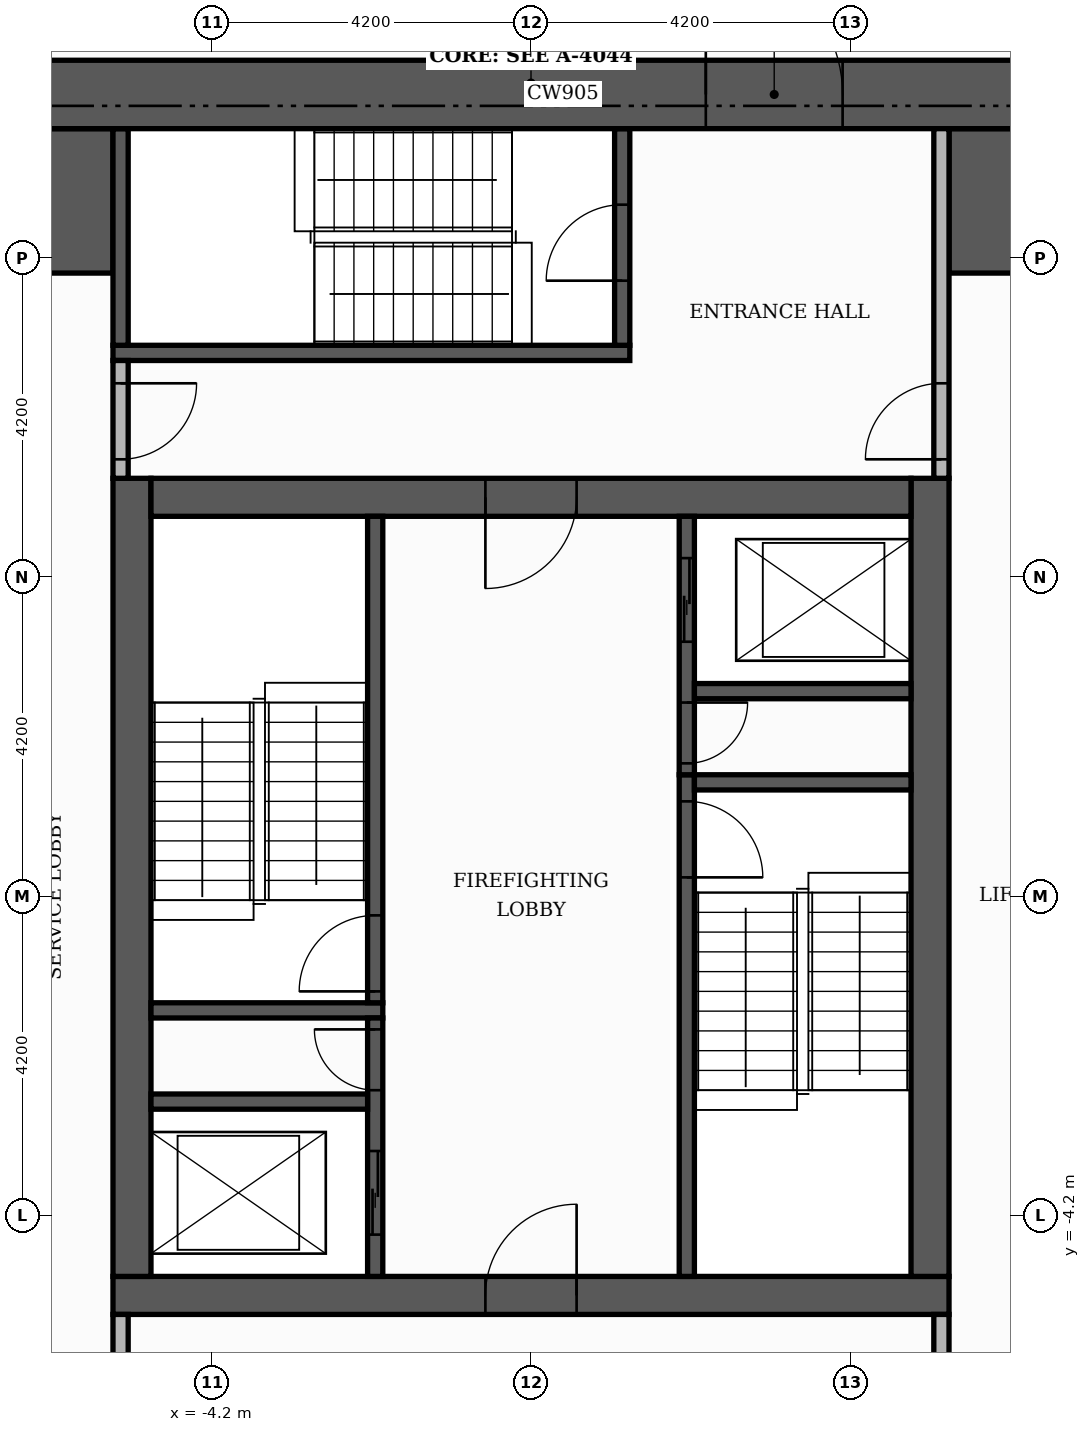
"""IFC4 building model, lengths in metres.
Left out: names, types, materials, properties, quantities, classifications, styles, units other than length and angle.
Written with IfcOpenShell. Run it as: python <this file> out.ifc"""

import sys

from ifc_helpers import new_model, si_unit, direction, frame, frame_2d, origin, place, context, subcontext, project, spatial, rectangle, extrude, element, fill, save


model = new_model("IFC4")
c1 = context("Model", 3, precision=1e-05, world=origin(), true_north=direction((0.0, 1.0)))
c2 = subcontext(c1, "Body", "Model", "MODEL_VIEW")
j1 = project(units=[si_unit("LENGTHUNIT", "METRE"), si_unit("PLANEANGLEUNIT", "RADIAN")], contexts=[c1])
p1 = place(None, origin())
s1 = spatial("IfcSite", under=j1, at=p1, CompositionType="ELEMENT")
p2 = place(p1, origin())
s2 = spatial("IfcBuilding", under=s1, at=p2, CompositionType="ELEMENT")
p3 = place(p2, frame((0.0, 0.0, 275.7)))
s3 = spatial("IfcBuildingStorey", under=s2, at=p3, CompositionType="ELEMENT", Elevation=275.7)
p4 = place(p3, frame((-5.5, -5.25, 0.0), z_axis=(0.0, 0.0, 1.0), x_axis=(1.0, 0.0, 0.0)))
e1 = element("IfcWall", 1, at=p4, inside=s3, PredefinedType="SHEAR", context=c2, shape_type="SweptSolid", body=[
    extrude(rectangle(XDim=11.0, YDim=0.5, at=frame_2d((5.5, 0.0))), origin(), (0.0, 0.0, 1.0), 3.48),
])
p5 = place(p4, frame((4.9, 0.0, 0.0)))
e2 = element("IfcOpeningElement", 2, at=p5, cuts=e1, PredefinedType="OPENING", context=c2, shape_type="SweptSolid", body=[
    extrude(rectangle(XDim=1.2, YDim=2.1, at=frame_2d((0.6, 1.05))), frame((0.0, 0.26, 0.0), z_axis=(0.0, -1.0, 0.0), x_axis=(1.0, 0.0, 0.0)), (0.0, 0.0, 1.0), 0.52),
])
for number, where, z_axis, x_axis in (
    (3, (-5.25, -5.0, 0.0), (0.0, 0.0, 1.0), (0.0, 1.0, 0.0)),
    (4, (5.25, -5.0, 0.0), (0.0, 0.0, 1.0), (0.0, 1.0, 0.0)),
):
    element("IfcWall", number, at=place(p3, frame(where, z_axis=z_axis, x_axis=x_axis)), inside=s3, PredefinedType="SHEAR", context=c2, shape_type="SweptSolid", body=[
        extrude(rectangle(XDim=10.5, YDim=0.5, at=frame_2d((5.25, 0.0))), origin(), (0.0, 0.0, 1.0), 3.48),
    ])
p6 = place(p3, frame((-5.0, 5.25, 0.0), z_axis=(0.0, 0.0, 1.0), x_axis=(1.0, 0.0, 0.0)))
e5 = element("IfcWall", 5, at=p6, inside=s3, PredefinedType="SHEAR", context=c2, shape_type="SweptSolid", body=[
    extrude(rectangle(XDim=10.0, YDim=0.5, at=frame_2d((5.0, 0.0))), origin(), (0.0, 0.0, 1.0), 3.48),
])
p7 = place(p6, frame((4.4, 0.0, 0.0)))
e6 = element("IfcOpeningElement", 6, at=p7, cuts=e5, PredefinedType="OPENING", context=c2, shape_type="SweptSolid", body=[
    extrude(rectangle(XDim=1.2, YDim=2.1, at=frame_2d((0.6, 1.05))), frame((0.0, 0.26, 0.0), z_axis=(0.0, -1.0, 0.0), x_axis=(1.0, 0.0, 0.0)), (0.0, 0.0, 1.0), 0.52),
])
for number, where, z_axis, x_axis in (
    (7, (-10.1, 9.15, 0.0), (0.0, 0.0, 1.0), (1.0, 0.0, 0.0)),
    (8, (5.5, 9.15, 0.0), (0.0, 0.0, 1.0), (1.0, 0.0, 0.0)),
):
    element("IfcWall", number, at=place(p3, frame(where, z_axis=z_axis, x_axis=x_axis)), inside=s3, PredefinedType="SHEAR", context=c2, shape_type="SweptSolid", body=[
        extrude(rectangle(XDim=4.6, YDim=1.9, at=frame_2d((2.3, 0.0))), origin(), (0.0, 0.0, 1.0), 3.48),
    ])
p8 = place(p3, frame((2.05, -5.0, 0.0), z_axis=(0.0, 0.0, 1.0), x_axis=(0.0, 1.0, 0.0)))
e9 = element("IfcWall", 9, at=p8, inside=s3, PredefinedType="SHEAR", context=c2, shape_type="SweptSolid", body=[
    extrude(rectangle(XDim=6.6, YDim=0.2, at=frame_2d((3.3, 0.0))), origin(), (0.0, 0.0, 1.0), 3.48),
])
p9 = place(p8, frame((5.25, 0.0, 0.0)))
e10 = element("IfcOpeningElement", 10, at=p9, cuts=e9, PredefinedType="OPENING", context=c2, shape_type="SweptSolid", body=[
    extrude(rectangle(XDim=1.0, YDim=2.1, at=frame_2d((0.5, 1.05))), frame((0.0, 0.11, 0.0), z_axis=(0.0, -1.0, 0.0), x_axis=(1.0, 0.0, 0.0)), (0.0, 0.0, 1.0), 0.22),
])
p10 = place(p3, frame((-5.0, -1.5, 0.0), z_axis=(0.0, 0.0, 1.0), x_axis=(1.0, 0.0, 0.0)))
e11 = element("IfcWall", 11, at=p10, inside=s3, PredefinedType="SHEAR", context=c2, shape_type="SweptSolid", body=[
    extrude(rectangle(XDim=3.05, YDim=0.2, at=frame_2d((1.525, 0.0))), origin(), (0.0, 0.0, 1.0), 3.48),
])
p11 = place(p3, frame((-2.05, -1.4, 0.0), z_axis=(0.0, 0.0, 1.0), x_axis=(0.0, 1.0, 0.0)))
e12 = element("IfcWall", 12, at=p11, inside=s3, PredefinedType="SHEAR", context=c2, shape_type="SweptSolid", body=[
    extrude(rectangle(XDim=6.4, YDim=0.2, at=frame_2d((3.2, 0.0))), origin(), (0.0, 0.0, 1.0), 3.48),
])
p12 = place(p11, frame((0.15, 0.0, 0.0)))
e13 = element("IfcOpeningElement", 13, at=p12, cuts=e12, PredefinedType="OPENING", context=c2, shape_type="SweptSolid", body=[
    extrude(rectangle(XDim=1.0, YDim=2.1, at=frame_2d((0.5, 1.05))), frame((0.0, 0.11, 0.0), z_axis=(0.0, -1.0, 0.0), x_axis=(1.0, 0.0, 0.0)), (0.0, 0.0, 1.0), 0.22),
])
p13 = place(p3, frame((2.15, 1.5, 0.0), z_axis=(0.0, 0.0, 1.0), x_axis=(1.0, 0.0, 0.0)))
e14 = element("IfcWall", 14, at=p13, inside=s3, PredefinedType="SHEAR", context=c2, shape_type="SweptSolid", body=[
    extrude(rectangle(XDim=2.85, YDim=0.2, at=frame_2d((1.425, 0.0))), origin(), (0.0, 0.0, 1.0), 3.48),
])
p14 = place(p3, frame((-5.5, 7.15, 0.0), z_axis=(0.0, 0.0, 1.0), x_axis=(1.0, 0.0, 0.0)))
e15 = element("IfcWall", 15, at=p14, inside=s3, PredefinedType="SHEAR", context=c2, shape_type="SweptSolid", body=[
    extrude(rectangle(XDim=6.8, YDim=0.2, at=frame_2d((3.4, 0.0))), origin(), (0.0, 0.0, 1.0), 3.48),
])
p15 = place(p3, frame((-5.4, 7.25, 0.0), z_axis=(0.0, 0.0, 1.0), x_axis=(0.0, 1.0, 0.0)))
e16 = element("IfcWall", 16, at=p15, inside=s3, PredefinedType="SHEAR", context=c2, shape_type="SweptSolid", body=[
    extrude(rectangle(XDim=2.85, YDim=0.2, at=frame_2d((1.425, 0.0))), origin(), (0.0, 0.0, 1.0), 3.48),
])
p16 = place(p3, frame((1.2, 7.25, 0.0), z_axis=(0.0, 0.0, 1.0), x_axis=(0.0, 1.0, 0.0)))
e17 = element("IfcWall", 17, at=p16, inside=s3, PredefinedType="SHEAR", context=c2, shape_type="SweptSolid", body=[
    extrude(rectangle(XDim=2.85, YDim=0.2, at=frame_2d((1.425, 0.0))), origin(), (0.0, 0.0, 1.0), 3.48),
])
p17 = place(p16, frame((0.85, 0.0, 0.0)))
e18 = element("IfcOpeningElement", 18, at=p17, cuts=e17, PredefinedType="OPENING", context=c2, shape_type="SweptSolid", body=[
    extrude(rectangle(XDim=1.0, YDim=2.1, at=frame_2d((0.5, 1.05))), frame((0.0, 0.11, 0.0), z_axis=(0.0, -1.0, 0.0), x_axis=(1.0, 0.0, 0.0)), (0.0, 0.0, 1.0), 0.22),
])
p18 = place(p3, frame((-2.05, -5.0, 0.0), z_axis=(0.0, 0.0, 1.0), x_axis=(0.0, 1.0, 0.0)))
e19 = element("IfcWall", 19, at=p18, inside=s3, PredefinedType="SHEAR", context=c2, shape_type="SweptSolid", body=[
    extrude(rectangle(XDim=3.4, YDim=0.2, at=frame_2d((1.7, 0.0))), origin(), (0.0, 0.0, 1.0), 3.48),
])
p19 = place(p18, frame((0.55, 0.0, 0.0)))
e20 = element("IfcOpeningElement", 20, at=p19, cuts=e19, PredefinedType="OPENING", context=c2, shape_type="SweptSolid", body=[
    extrude(rectangle(XDim=1.1, YDim=2.1, at=frame_2d((0.55, 1.05))), frame((0.0, 0.11, 0.0), z_axis=(0.0, -1.0, 0.0), x_axis=(1.0, 0.0, 0.0)), (0.0, 0.0, 1.0), 0.22),
])
p20 = place(p18, frame((2.45, 0.0, 0.0)))
e21 = element("IfcOpeningElement", 21, at=p20, cuts=e19, PredefinedType="OPENING", context=c2, shape_type="SweptSolid", body=[
    extrude(rectangle(XDim=0.8, YDim=2.1, at=frame_2d((0.4, 1.05))), frame((0.0, 0.11, 0.0), z_axis=(0.0, -1.0, 0.0), x_axis=(1.0, 0.0, 0.0)), (0.0, 0.0, 1.0), 0.22),
])
p21 = place(p3, frame((-5.0, -2.7, 0.0), z_axis=(0.0, 0.0, 1.0), x_axis=(1.0, 0.0, 0.0)))
e22 = element("IfcWall", 22, at=p21, inside=s3, PredefinedType="SHEAR", context=c2, shape_type="SweptSolid", body=[
    extrude(rectangle(XDim=2.85, YDim=0.2, at=frame_2d((1.425, 0.0))), origin(), (0.0, 0.0, 1.0), 3.48),
])
p22 = place(p3, frame((2.05, 1.6, 0.0), z_axis=(0.0, 0.0, 1.0), x_axis=(0.0, 1.0, 0.0)))
e23 = element("IfcWall", 23, at=p22, inside=s3, PredefinedType="SHEAR", context=c2, shape_type="SweptSolid", body=[
    extrude(rectangle(XDim=3.4, YDim=0.2, at=frame_2d((1.7, 0.0))), origin(), (0.0, 0.0, 1.0), 3.48),
])
p23 = place(p22, frame((1.75, 0.0, 0.0)))
e24 = element("IfcOpeningElement", 24, at=p23, cuts=e23, PredefinedType="OPENING", context=c2, shape_type="SweptSolid", body=[
    extrude(rectangle(XDim=1.1, YDim=2.1, at=frame_2d((0.55, 1.05))), frame((0.0, 0.11, 0.0), z_axis=(0.0, -1.0, 0.0), x_axis=(1.0, 0.0, 0.0)), (0.0, 0.0, 1.0), 0.22),
])
p24 = place(p22, frame((0.15, 0.0, 0.0)))
e25 = element("IfcOpeningElement", 25, at=p24, cuts=e23, PredefinedType="OPENING", context=c2, shape_type="SweptSolid", body=[
    extrude(rectangle(XDim=0.8, YDim=2.1, at=frame_2d((0.4, 1.05))), frame((0.0, 0.11, 0.0), z_axis=(0.0, -1.0, 0.0), x_axis=(1.0, 0.0, 0.0)), (0.0, 0.0, 1.0), 0.22),
])
p25 = place(p3, frame((2.15, 2.7, 0.0), z_axis=(0.0, 0.0, 1.0), x_axis=(1.0, 0.0, 0.0)))
e26 = element("IfcWall", 26, at=p25, inside=s3, PredefinedType="SHEAR", context=c2, shape_type="SweptSolid", body=[
    extrude(rectangle(XDim=2.85, YDim=0.2, at=frame_2d((1.425, 0.0))), origin(), (0.0, 0.0, 1.0), 3.48),
])
p26 = place(p3, frame((-11.0, 10.55, 0.0), z_axis=(0.0, 0.0, 1.0), x_axis=(1.0, 0.0, 0.0)))
e27 = element("IfcWall", 27, at=p26, inside=s3, PredefinedType="SHEAR", context=c2, shape_type="SweptSolid", body=[
    extrude(rectangle(XDim=22.0, YDim=0.9, at=frame_2d((11.0, 0.0))), origin(), (0.0, 0.0, 1.0), 3.48),
])
p27 = place(p26, frame((13.3, 0.0, 0.0)))
e28 = element("IfcOpeningElement", 28, at=p27, cuts=e27, PredefinedType="OPENING", context=c2, shape_type="SweptSolid", body=[
    extrude(rectangle(XDim=1.8, YDim=2.2, at=frame_2d((0.9, 1.1))), frame((0.0, 0.46, 0.0), z_axis=(0.0, -1.0, 0.0), x_axis=(1.0, 0.0, 0.0)), (0.0, 0.0, 1.0), 0.92),
])
p28 = place(p3, frame((-5.4, -10.1, 0.0), z_axis=(0.0, 0.0, 1.0), x_axis=(0.0, 1.0, 0.0)))
e29 = element("IfcWall", 29, at=p28, inside=s3, PredefinedType="PARTITIONING", context=c2, shape_type="SweptSolid", body=[
    extrude(rectangle(XDim=4.6, YDim=0.2, at=frame_2d((2.3, 0.0))), origin(), (0.0, 0.0, 1.0), 3.48),
])
p29 = place(p28, frame((2.9, 0.0, 0.0)))
e30 = element("IfcOpeningElement", 30, at=p29, cuts=e29, PredefinedType="OPENING", context=c2, shape_type="SweptSolid", body=[
    extrude(rectangle(XDim=1.0, YDim=2.1, at=frame_2d((0.5, 1.05))), frame((0.0, 0.11, 0.0), z_axis=(0.0, -1.0, 0.0), x_axis=(1.0, 0.0, 0.0)), (0.0, 0.0, 1.0), 0.22),
])
p30 = place(p3, frame((5.4, -10.1, 0.0), z_axis=(0.0, 0.0, 1.0), x_axis=(0.0, 1.0, 0.0)))
e31 = element("IfcWall", 31, at=p30, inside=s3, PredefinedType="PARTITIONING", context=c2, shape_type="SweptSolid", body=[
    extrude(rectangle(XDim=4.6, YDim=0.2, at=frame_2d((2.3, 0.0))), origin(), (0.0, 0.0, 1.0), 3.48),
])
p31 = place(p30, frame((2.9, 0.0, 0.0)))
e32 = element("IfcOpeningElement", 32, at=p31, cuts=e31, PredefinedType="OPENING", context=c2, shape_type="SweptSolid", body=[
    extrude(rectangle(XDim=1.0, YDim=2.1, at=frame_2d((0.5, 1.05))), frame((0.0, 0.11, 0.0), z_axis=(0.0, -1.0, 0.0), x_axis=(1.0, 0.0, 0.0)), (0.0, 0.0, 1.0), 0.22),
])
p32 = place(p3, frame((-5.4, 5.5, 0.0), z_axis=(0.0, 0.0, 1.0), x_axis=(0.0, 1.0, 0.0)))
e33 = element("IfcWall", 33, at=p32, inside=s3, PredefinedType="PARTITIONING", context=c2, shape_type="SweptSolid", body=[
    extrude(rectangle(XDim=1.55, YDim=0.2, at=frame_2d((0.775, 0.0))), origin(), (0.0, 0.0, 1.0), 3.48),
])
p33 = place(p32, frame((0.25, 0.0, 0.0)))
e34 = element("IfcOpeningElement", 34, at=p33, cuts=e33, PredefinedType="OPENING", context=c2, shape_type="SweptSolid", body=[
    extrude(rectangle(XDim=1.0, YDim=2.1, at=frame_2d((0.5, 1.05))), frame((0.0, 0.11, 0.0), z_axis=(0.0, -1.0, 0.0), x_axis=(1.0, 0.0, 0.0)), (0.0, 0.0, 1.0), 0.22),
])
p34 = place(p3, frame((5.4, 5.5, 0.0), z_axis=(0.0, 0.0, 1.0), x_axis=(0.0, 1.0, 0.0)))
e35 = element("IfcWall", 35, at=p34, inside=s3, PredefinedType="PARTITIONING", context=c2, shape_type="SweptSolid", body=[
    extrude(rectangle(XDim=4.6, YDim=0.2, at=frame_2d((2.3, 0.0))), origin(), (0.0, 0.0, 1.0), 3.48),
])
p35 = place(p34, frame((0.25, 0.0, 0.0)))
e36 = element("IfcOpeningElement", 36, at=p35, cuts=e35, PredefinedType="OPENING", context=c2, shape_type="SweptSolid", body=[
    extrude(rectangle(XDim=1.0, YDim=2.1, at=frame_2d((0.5, 1.05))), frame((0.0, 0.11, 0.0), z_axis=(0.0, -1.0, 0.0), x_axis=(1.0, 0.0, 0.0)), (0.0, 0.0, 1.0), 0.22),
])
p36 = place(p23, origin())
e37 = element("IfcDoor", 37, at=p36, inside=s3, OperationType="SLIDING_TO_LEFT", PredefinedType="DOOR", context=c2, shape_type="SweptSolid", body=[
    extrude(rectangle(XDim=1.1, YDim=2.1, at=frame_2d((0.55, 1.05))), frame((0.0, 0.025, 0.0), z_axis=(0.0, -1.0, 0.0), x_axis=(1.0, 0.0, 0.0)), (0.0, 0.0, 1.0), 0.05),
])
fill(e24, e37)
p37 = place(p19, origin())
e38 = element("IfcDoor", 38, at=p37, inside=s3, OperationType="SLIDING_TO_LEFT", PredefinedType="DOOR", context=c2, shape_type="SweptSolid", body=[
    extrude(rectangle(XDim=1.1, YDim=2.1, at=frame_2d((0.55, 1.05))), frame((0.0, 0.025, 0.0), z_axis=(0.0, -1.0, 0.0), x_axis=(1.0, 0.0, 0.0)), (0.0, 0.0, 1.0), 0.05),
])
fill(e20, e38)
p38 = place(p12, origin())
e39 = element("IfcDoor", 39, at=p38, inside=s3, OperationType="SINGLE_SWING_LEFT", PredefinedType="DOOR", context=c2, shape_type="SweptSolid", body=[
    extrude(rectangle(XDim=1.0, YDim=2.1, at=frame_2d((0.5, 1.05))), frame((0.0, 0.025, 0.0), z_axis=(0.0, -1.0, 0.0), x_axis=(1.0, 0.0, 0.0)), (0.0, 0.0, 1.0), 0.05),
])
fill(e13, e39)
p39 = place(p9, frame((1.0, 0.0, 0.0), z_axis=(0.0, 0.0, 1.0), x_axis=(-1.0, 0.0, 0.0)))
e40 = element("IfcDoor", 40, at=p39, inside=s3, OperationType="SINGLE_SWING_LEFT", PredefinedType="DOOR", context=c2, shape_type="SweptSolid", body=[
    extrude(rectangle(XDim=1.0, YDim=2.1, at=frame_2d((0.5, 1.05))), frame((0.0, 0.025, 0.0), z_axis=(0.0, -1.0, 0.0), x_axis=(1.0, 0.0, 0.0)), (0.0, 0.0, 1.0), 0.05),
])
fill(e10, e40)
p40 = place(p24, frame((0.8, 0.0, 0.0), z_axis=(0.0, 0.0, 1.0), x_axis=(-1.0, 0.0, 0.0)))
e41 = element("IfcDoor", 41, at=p40, inside=s3, OperationType="SINGLE_SWING_RIGHT", PredefinedType="DOOR", context=c2, shape_type="SweptSolid", body=[
    extrude(rectangle(XDim=0.8, YDim=2.1, at=frame_2d((0.4, 1.05))), frame((0.0, 0.025, 0.0), z_axis=(0.0, -1.0, 0.0), x_axis=(1.0, 0.0, 0.0)), (0.0, 0.0, 1.0), 0.05),
])
fill(e25, e41)
p41 = place(p20, origin())
e42 = element("IfcDoor", 42, at=p41, inside=s3, OperationType="SINGLE_SWING_RIGHT", PredefinedType="DOOR", context=c2, shape_type="SweptSolid", body=[
    extrude(rectangle(XDim=0.8, YDim=2.1, at=frame_2d((0.4, 1.05))), frame((0.0, 0.025, 0.0), z_axis=(0.0, -1.0, 0.0), x_axis=(1.0, 0.0, 0.0)), (0.0, 0.0, 1.0), 0.05),
])
fill(e21, e42)
p42 = place(p7, frame((1.2, 0.0, 0.0), z_axis=(0.0, 0.0, 1.0), x_axis=(-1.0, 0.0, 0.0)))
e43 = element("IfcDoor", 43, at=p42, inside=s3, OperationType="SINGLE_SWING_LEFT", PredefinedType="DOOR", context=c2, shape_type="SweptSolid", body=[
    extrude(rectangle(XDim=1.2, YDim=2.1, at=frame_2d((0.6, 1.05))), frame((0.0, 0.025, 0.0), z_axis=(0.0, -1.0, 0.0), x_axis=(1.0, 0.0, 0.0)), (0.0, 0.0, 1.0), 0.05),
])
fill(e6, e43)
p43 = place(p5, origin())
e44 = element("IfcDoor", 44, at=p43, inside=s3, OperationType="SINGLE_SWING_RIGHT", PredefinedType="DOOR", context=c2, shape_type="SweptSolid", body=[
    extrude(rectangle(XDim=1.2, YDim=2.1, at=frame_2d((0.6, 1.05))), frame((0.0, 0.025, 0.0), z_axis=(0.0, -1.0, 0.0), x_axis=(1.0, 0.0, 0.0)), (0.0, 0.0, 1.0), 0.05),
])
fill(e2, e44)
p44 = place(p17, origin())
e45 = element("IfcDoor", 45, at=p44, inside=s3, OperationType="SINGLE_SWING_LEFT", PredefinedType="DOOR", context=c2, shape_type="SweptSolid", body=[
    extrude(rectangle(XDim=1.0, YDim=2.1, at=frame_2d((0.5, 1.05))), frame((0.0, 0.025, 0.0), z_axis=(0.0, -1.0, 0.0), x_axis=(1.0, 0.0, 0.0)), (0.0, 0.0, 1.0), 0.05),
])
fill(e18, e45)
p45 = place(p33, frame((1.0, 0.0, 0.0), z_axis=(0.0, 0.0, 1.0), x_axis=(-1.0, 0.0, 0.0)))
e46 = element("IfcDoor", 46, at=p45, inside=s3, OperationType="SINGLE_SWING_RIGHT", PredefinedType="DOOR", context=c2, shape_type="SweptSolid", body=[
    extrude(rectangle(XDim=1.0, YDim=2.1, at=frame_2d((0.5, 1.05))), frame((0.0, 0.025, 0.0), z_axis=(0.0, -1.0, 0.0), x_axis=(1.0, 0.0, 0.0)), (0.0, 0.0, 1.0), 0.05),
])
fill(e34, e46)
p46 = place(p35, origin())
e47 = element("IfcDoor", 47, at=p46, inside=s3, OperationType="SINGLE_SWING_LEFT", PredefinedType="DOOR", context=c2, shape_type="SweptSolid", body=[
    extrude(rectangle(XDim=1.0, YDim=2.1, at=frame_2d((0.5, 1.05))), frame((0.0, 0.025, 0.0), z_axis=(0.0, -1.0, 0.0), x_axis=(1.0, 0.0, 0.0)), (0.0, 0.0, 1.0), 0.05),
])
fill(e36, e47)
p47 = place(p27, origin())
e48 = element("IfcDoor", 48, at=p47, inside=s3, OperationType="DOUBLE_DOOR_SINGLE_SWING", PredefinedType="DOOR", context=c2, shape_type="SweptSolid", body=[
    extrude(rectangle(XDim=1.8, YDim=2.2, at=frame_2d((0.9, 1.1))), frame((0.0, 0.025, 0.0), z_axis=(0.0, -1.0, 0.0), x_axis=(1.0, 0.0, 0.0)), (0.0, 0.0, 1.0), 0.05),
])
fill(e28, e48)
save(model, sys.argv[1])
